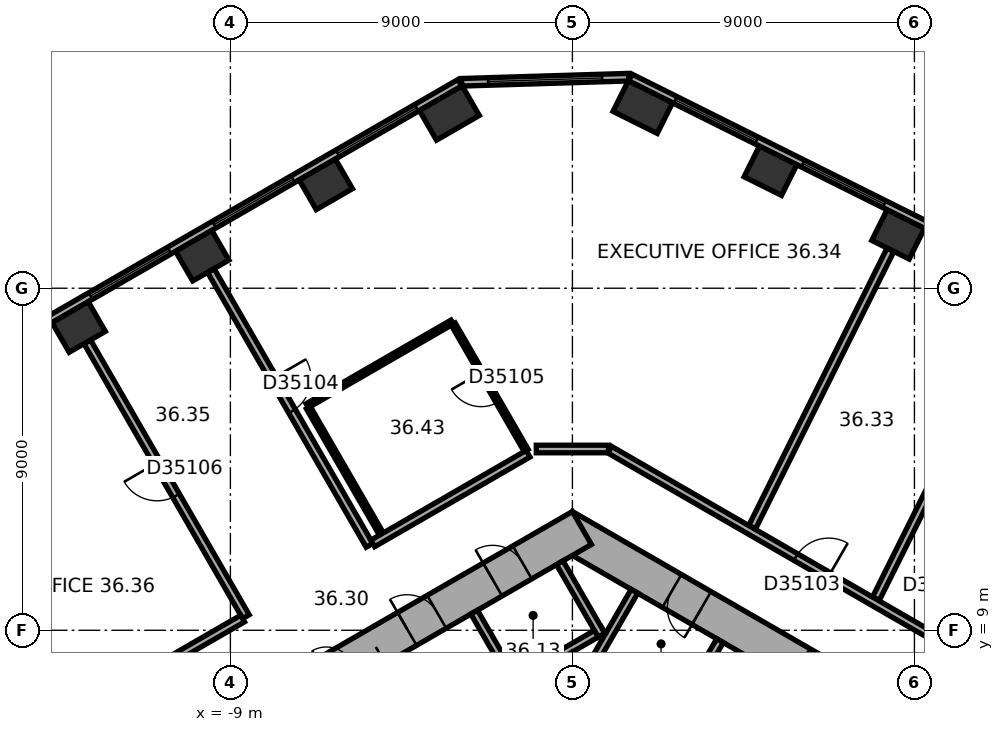
"""IFC4 building model, lengths in metres.
Left out: names, types, materials, properties, quantities, classifications, styles, units other than length and angle.
Written with IfcOpenShell. Run it as: python <this file> out.ifc"""

import sys

from ifc_helpers import new_model, si_unit, direction, frame, frame_2d, origin, origin_2d, place, context, subcontext, project, spatial, rectangle, extrude, element, fill, save


model = new_model("IFC4")
c1 = context("Model", 3, precision=1e-05, world=origin(), true_north=direction((0.0, 1.0)))
c2 = subcontext(c1, "Body", "Model", "MODEL_VIEW")
j1 = project(units=[si_unit("LENGTHUNIT", "METRE"), si_unit("PLANEANGLEUNIT", "RADIAN")], contexts=[c1])
p1 = place(None, origin())
s1 = spatial("IfcSite", under=j1, at=p1, CompositionType="ELEMENT")
p2 = place(p1, origin())
s2 = spatial("IfcBuilding", under=s1, at=p2, CompositionType="ELEMENT")
p3 = place(p2, frame((0.0, 0.0, 150.3)))
s3 = spatial("IfcBuildingStorey", under=s2, at=p3, CompositionType="ELEMENT", Elevation=150.3)
for number, where, z_axis, x_axis in (
    (1, (8.571, 19.416, 0.0), (0.0, 0.0, 1.0), (-0.895, 0.446, 0.0)),
    (2, (5.211, 21.091, 0.0), (0.0, 0.0, 1.0), (-0.895, 0.446, 0.0)),
):
    element("IfcColumn", number, at=place(p3, frame(where, z_axis=z_axis, x_axis=x_axis)), inside=s3, PredefinedType="COLUMN", context=c2, shape_type="SweptSolid", body=[
        extrude(rectangle(XDim=1.1, YDim=0.9, at=origin_2d()), origin(), (0.0, 0.0, 1.0), 3.7),
    ])
for number, where, z_axis, x_axis in (
    (3, (1.852, 22.766, 0.0), (0.0, 0.0, 1.0), (-0.895, 0.446, 0.0)),
    (4, (-3.238, 22.61, 0.0), (0.0, 0.0, 1.0), (-0.866, -0.5, 0.0)),
):
    element("IfcColumn", number, at=place(p3, frame(where, z_axis=z_axis, x_axis=x_axis)), inside=s3, PredefinedType="COLUMN", context=c2, shape_type="SweptSolid", body=[
        extrude(rectangle(XDim=1.3, YDim=0.9, at=origin_2d()), origin(), (0.0, 0.0, 1.0), 3.7),
    ])
for number, where, z_axis, x_axis in (
    (5, (-6.489, 20.733, 0.0), (0.0, 0.0, 1.0), (-0.866, -0.5, 0.0)),
    (6, (-9.74, 18.856, 0.0), (0.0, 0.0, 1.0), (-0.866, -0.5, 0.0)),
    (7, (-12.991, 16.979, 0.0), (0.0, 0.0, 1.0), (-0.866, -0.5, 0.0)),
):
    element("IfcColumn", number, at=place(p3, frame(where, z_axis=z_axis, x_axis=x_axis)), inside=s3, PredefinedType="COLUMN", context=c2, shape_type="SweptSolid", body=[
        extrude(rectangle(XDim=1.1, YDim=0.9, at=origin_2d()), origin(), (0.0, 0.0, 1.0), 3.7),
    ])
p4 = place(p3, frame((10.25, 5.629, 0.0), z_axis=(0.0, 0.0, 1.0), x_axis=(-0.866022616891, 0.50000482701, 0.0)))
e8 = element("IfcWall", 8, at=p4, inside=s3, PredefinedType="SHEAR", context=c2, shape_type="SweptSolid", body=[
    extrude(rectangle(XDim=12.125, YDim=1.0, at=frame_2d((6.062, 0.0))), origin(), (0.0, 0.0, 1.0), 3.7),
])
p5 = place(p4, frame((4.012, 0.0, 0.0)))
e9 = element("IfcOpeningElement", 9, at=p5, cuts=e8, PredefinedType="OPENING", context=c2, shape_type="SweptSolid", body=[
    extrude(rectangle(XDim=0.9, YDim=2.1, at=frame_2d((0.45, 1.05))), frame((0.0, 0.51, 0.0), z_axis=(0.0, -1.0, 0.0), x_axis=(1.0, 0.0, 0.0)), (0.0, 0.0, 1.0), 1.02),
])
p6 = place(p4, frame((7.912, 0.0, 0.0)))
e10 = element("IfcOpeningElement", 10, at=p6, cuts=e8, PredefinedType="OPENING", context=c2, shape_type="SweptSolid", body=[
    extrude(rectangle(XDim=0.9, YDim=2.1, at=frame_2d((0.45, 1.05))), frame((0.0, 0.51, 0.0), z_axis=(0.0, -1.0, 0.0), x_axis=(1.0, 0.0, 0.0)), (0.0, 0.0, 1.0), 1.02),
])
p7 = place(p3, frame((0.25, 11.691, 0.0), z_axis=(0.0, 0.0, 1.0), x_axis=(-0.866022616891, -0.50000482701, 0.0)))
e11 = element("IfcWall", 11, at=p7, inside=s3, PredefinedType="SHEAR", context=c2, shape_type="SweptSolid", body=[
    extrude(rectangle(XDim=12.125, YDim=1.0, at=frame_2d((6.062, 0.0))), origin(), (0.0, 0.0, 1.0), 3.7),
])
p8 = place(p7, frame((6.262, 0.0, 0.0)))
e12 = element("IfcOpeningElement", 12, at=p8, cuts=e11, PredefinedType="OPENING", context=c2, shape_type="SweptSolid", body=[
    extrude(rectangle(XDim=1.5, YDim=2.1, at=frame_2d((0.75, 1.05))), frame((0.0, 0.51, 0.0), z_axis=(0.0, -1.0, 0.0), x_axis=(1.0, 0.0, 0.0)), (0.0, 0.0, 1.0), 1.02),
])
p9 = place(p7, frame((1.812, 0.0, 0.0)))
e13 = element("IfcOpeningElement", 13, at=p9, cuts=e11, PredefinedType="OPENING", context=c2, shape_type="SweptSolid", body=[
    extrude(rectangle(XDim=0.9, YDim=2.1, at=frame_2d((0.45, 1.05))), frame((0.0, 0.51, 0.0), z_axis=(0.0, -1.0, 0.0), x_axis=(1.0, 0.0, 0.0)), (0.0, 0.0, 1.0), 1.02),
])
p10 = place(p7, frame((4.412, 0.0, 0.0)))
e14 = element("IfcOpeningElement", 14, at=p10, cuts=e11, PredefinedType="OPENING", context=c2, shape_type="SweptSolid", body=[
    extrude(rectangle(XDim=0.9, YDim=2.1, at=frame_2d((0.45, 1.05))), frame((0.0, 0.51, 0.0), z_axis=(0.0, -1.0, 0.0), x_axis=(1.0, 0.0, 0.0)), (0.0, 0.0, 1.0), 1.02),
])
p11 = place(p3, frame((19.464, 14.599, 0.0), z_axis=(0.0, 0.0, 1.0), x_axis=(-0.894935755043, 0.446195018289, 0.0)))
e15 = element("IfcWall", 15, at=p11, inside=s3, PredefinedType="STANDARD", context=c2, shape_type="SweptSolid", body=[
    extrude(rectangle(XDim=20.044, YDim=0.2, at=frame_2d((10.022, 0.0))), origin(), (0.0, 0.0, 1.0), 3.7),
])
p12 = place(p11, frame((1.313, 0.0, 0.9)))
e16 = element("IfcOpeningElement", 16, at=p12, cuts=e15, PredefinedType="OPENING", context=c2, shape_type="SweptSolid", body=[
    extrude(rectangle(XDim=2.4, YDim=2.0, at=frame_2d((1.2, 1.0))), frame((0.0, 0.11, 0.0), z_axis=(0.0, -1.0, 0.0), x_axis=(1.0, 0.0, 0.0)), (0.0, 0.0, 1.0), 0.22),
])
p13 = place(p11, frame((5.067, 0.0, 0.9)))
e17 = element("IfcOpeningElement", 17, at=p13, cuts=e15, PredefinedType="OPENING", context=c2, shape_type="SweptSolid", body=[
    extrude(rectangle(XDim=2.4, YDim=2.0, at=frame_2d((1.2, 1.0))), frame((0.0, 0.11, 0.0), z_axis=(0.0, -1.0, 0.0), x_axis=(1.0, 0.0, 0.0)), (0.0, 0.0, 1.0), 0.22),
])
p14 = place(p11, frame((8.821, 0.0, 0.9)))
e18 = element("IfcOpeningElement", 18, at=p14, cuts=e15, PredefinedType="OPENING", context=c2, shape_type="SweptSolid", body=[
    extrude(rectangle(XDim=2.4, YDim=2.0, at=frame_2d((1.2, 1.0))), frame((0.0, 0.11, 0.0), z_axis=(0.0, -1.0, 0.0), x_axis=(1.0, 0.0, 0.0)), (0.0, 0.0, 1.0), 0.22),
])
p15 = place(p11, frame((12.575, 0.0, 0.9)))
e19 = element("IfcOpeningElement", 19, at=p15, cuts=e15, PredefinedType="OPENING", context=c2, shape_type="SweptSolid", body=[
    extrude(rectangle(XDim=2.4, YDim=2.0, at=frame_2d((1.2, 1.0))), frame((0.0, 0.11, 0.0), z_axis=(0.0, -1.0, 0.0), x_axis=(1.0, 0.0, 0.0)), (0.0, 0.0, 1.0), 0.22),
])
p16 = place(p11, frame((16.329, 0.0, 0.9)))
e20 = element("IfcOpeningElement", 20, at=p16, cuts=e15, PredefinedType="OPENING", context=c2, shape_type="SweptSolid", body=[
    extrude(rectangle(XDim=2.4, YDim=2.0, at=frame_2d((1.2, 1.0))), frame((0.0, 0.11, 0.0), z_axis=(0.0, -1.0, 0.0), x_axis=(1.0, 0.0, 0.0)), (0.0, 0.0, 1.0), 0.22),
])
p17 = place(p3, frame((1.479, 23.553, 0.0), z_axis=(0.0, 0.0, 1.0), x_axis=(-0.999534786117, -0.03049936625, 0.0)))
e21 = element("IfcWall", 21, at=p17, inside=s3, PredefinedType="STANDARD", context=c2, shape_type="SweptSolid", body=[
    extrude(rectangle(XDim=4.395, YDim=0.2, at=frame_2d((2.197, 0.0))), origin(), (0.0, 0.0, 1.0), 3.7),
])
p18 = place(p17, frame((0.698, 0.0, 0.9)))
e22 = element("IfcOpeningElement", 22, at=p18, cuts=e21, PredefinedType="OPENING", context=c2, shape_type="SweptSolid", body=[
    extrude(rectangle(XDim=3.0, YDim=2.0, at=frame_2d((1.5, 1.0))), frame((0.0, 0.11, 0.0), z_axis=(0.0, -1.0, 0.0), x_axis=(1.0, 0.0, 0.0)), (0.0, 0.0, 1.0), 0.22),
])
p19 = place(p3, frame((-2.961, 23.405, 0.0), z_axis=(0.0, 0.0, 1.0), x_axis=(-0.866023315909, -0.500003616288, 0.0)))
e23 = element("IfcWall", 23, at=p19, inside=s3, PredefinedType="STANDARD", context=c2, shape_type="SweptSolid", body=[
    extrude(rectangle(XDim=20.044, YDim=0.2, at=frame_2d((10.022, 0.0))), origin(), (0.0, 0.0, 1.0), 3.7),
])
p20 = place(p19, frame((1.314, 0.0, 0.9)))
e24 = element("IfcOpeningElement", 24, at=p20, cuts=e23, PredefinedType="OPENING", context=c2, shape_type="SweptSolid", body=[
    extrude(rectangle(XDim=2.4, YDim=2.0, at=frame_2d((1.2, 1.0))), frame((0.0, 0.11, 0.0), z_axis=(0.0, -1.0, 0.0), x_axis=(1.0, 0.0, 0.0)), (0.0, 0.0, 1.0), 0.22),
])
p21 = place(p19, frame((5.069, 0.0, 0.9)))
e25 = element("IfcOpeningElement", 25, at=p21, cuts=e23, PredefinedType="OPENING", context=c2, shape_type="SweptSolid", body=[
    extrude(rectangle(XDim=2.4, YDim=2.0, at=frame_2d((1.2, 1.0))), frame((0.0, 0.11, 0.0), z_axis=(0.0, -1.0, 0.0), x_axis=(1.0, 0.0, 0.0)), (0.0, 0.0, 1.0), 0.22),
])
p22 = place(p19, frame((8.823, 0.0, 0.9)))
e26 = element("IfcOpeningElement", 26, at=p22, cuts=e23, PredefinedType="OPENING", context=c2, shape_type="SweptSolid", body=[
    extrude(rectangle(XDim=2.4, YDim=2.0, at=frame_2d((1.2, 1.0))), frame((0.0, 0.11, 0.0), z_axis=(0.0, -1.0, 0.0), x_axis=(1.0, 0.0, 0.0)), (0.0, 0.0, 1.0), 0.22),
])
p23 = place(p19, frame((12.577, 0.0, 0.9)))
e27 = element("IfcOpeningElement", 27, at=p23, cuts=e23, PredefinedType="OPENING", context=c2, shape_type="SweptSolid", body=[
    extrude(rectangle(XDim=2.4, YDim=2.0, at=frame_2d((1.2, 1.0))), frame((0.0, 0.11, 0.0), z_axis=(0.0, -1.0, 0.0), x_axis=(1.0, 0.0, 0.0)), (0.0, 0.0, 1.0), 0.22),
])
p24 = place(p19, frame((16.331, 0.0, 0.9)))
e28 = element("IfcOpeningElement", 28, at=p24, cuts=e23, PredefinedType="OPENING", context=c2, shape_type="SweptSolid", body=[
    extrude(rectangle(XDim=2.4, YDim=2.0, at=frame_2d((1.2, 1.0))), frame((0.0, 0.11, 0.0), z_axis=(0.0, -1.0, 0.0), x_axis=(1.0, 0.0, 0.0)), (0.0, 0.0, 1.0), 0.22),
])
for number, where, z_axis, x_axis in (
    (29, (2.784, 6.822, 0.0), (0.0, 0.0, 1.0), (0.5, 0.866, 0.0)),
    (30, (0.532, 8.122, 0.0), (0.0, 0.0, 1.0), (0.5, 0.866, 0.0)),
):
    element("IfcWall", number, at=place(p3, frame(where, z_axis=z_axis, x_axis=x_axis)), inside=s3, PredefinedType="PARTITIONING", context=c2, shape_type="SweptSolid", body=[
        extrude(rectangle(XDim=2.2, YDim=0.2, at=frame_2d((1.1, 0.0))), origin(), (0.0, 0.0, 1.0), 3.42),
    ])
p25 = place(p3, frame((0.803, 9.009, 0.0), z_axis=(0.0, 0.0, 1.0), x_axis=(-0.866028230842, -0.499995103361, 0.0)))
e31 = element("IfcWall", 31, at=p25, inside=s3, PredefinedType="PARTITIONING", context=c2, shape_type="SweptSolid", body=[
    extrude(rectangle(XDim=5.4, YDim=0.2, at=frame_2d((2.7, 0.0))), origin(), (0.0, 0.0, 1.0), 3.42),
])
p26 = place(p3, frame((0.767, 8.872, 0.0), z_axis=(0.0, 0.0, 1.0), x_axis=(-0.499994660107, 0.866028486751, 0.0)))
e32 = element("IfcWall", 32, at=p26, inside=s3, PredefinedType="PARTITIONING", context=c2, shape_type="SweptSolid", body=[
    extrude(rectangle(XDim=2.2, YDim=0.2, at=frame_2d((1.1, 0.0))), origin(), (0.0, 0.0, 1.0), 3.42),
])
p27 = place(p3, frame((-1.485, 7.572, 0.0), z_axis=(0.0, 0.0, 1.0), x_axis=(-0.50002983664, 0.866008176907, 0.0)))
e33 = element("IfcWall", 33, at=p27, inside=s3, PredefinedType="PARTITIONING", context=c2, shape_type="SweptSolid", body=[
    extrude(rectangle(XDim=2.2, YDim=0.2, at=frame_2d((1.1, 0.0))), origin(), (0.0, 0.0, 1.0), 3.42),
])
p28 = place(p3, frame((-2.216, 4.282, 0.0), z_axis=(0.0, 0.0, 1.0), x_axis=(0.499977259774, 0.866038532462, 0.0)))
e34 = element("IfcWall", 34, at=p28, inside=s3, PredefinedType="SHEAR", context=c2, shape_type="SweptSolid", body=[
    extrude(rectangle(XDim=4.7, YDim=0.3, at=frame_2d((2.35, 0.0))), origin(), (0.0, 0.0, 1.0), 3.42),
])
p29 = place(p3, frame((-12.766, 16.589, 0.0), z_axis=(0.0, 0.0, 1.0), x_axis=(0.500010139422, -0.866019549707, 0.0)))
e35 = element("IfcWall", 35, at=p29, inside=s3, PredefinedType="PARTITIONING", context=c2, shape_type="SweptSolid", body=[
    extrude(rectangle(XDim=8.35, YDim=0.2, at=frame_2d((4.175, 0.0))), origin(), (0.0, 0.0, 1.0), 3.42),
])
p30 = place(p29, frame((3.675, 0.0, 0.0)))
e36 = element("IfcOpeningElement", 36, at=p30, cuts=e35, PredefinedType="OPENING", context=c2, shape_type="SweptSolid", body=[
    extrude(rectangle(XDim=1.0, YDim=2.1, at=frame_2d((0.5, 1.05))), frame((0.0, 0.11, 0.0), z_axis=(0.0, -1.0, 0.0), x_axis=(1.0, 0.0, 0.0)), (0.0, 0.0, 1.0), 0.22),
])
p31 = place(p3, frame((-9.515, 18.466, 0.0), z_axis=(0.0, 0.0, 1.0), x_axis=(0.500010139422, -0.866019549707, 0.0)))
e37 = element("IfcWall", 37, at=p31, inside=s3, PredefinedType="PARTITIONING", context=c2, shape_type="SweptSolid", body=[
    extrude(rectangle(XDim=8.35, YDim=0.2, at=frame_2d((4.175, 0.0))), origin(), (0.0, 0.0, 1.0), 2.87),
])
p32 = place(p31, frame((3.275, 0.0, 0.0)))
e38 = element("IfcOpeningElement", 38, at=p32, cuts=e37, PredefinedType="OPENING", context=c2, shape_type="SweptSolid", body=[
    extrude(rectangle(XDim=1.0, YDim=2.1, at=frame_2d((0.5, 1.05))), frame((0.0, 0.11, 0.0), z_axis=(0.0, -1.0, 0.0), x_axis=(1.0, 0.0, 0.0)), (0.0, 0.0, 1.0), 0.22),
])
p33 = place(p3, frame((-8.678, 9.308, 0.0), z_axis=(0.0, 0.0, 1.0), x_axis=(-0.866000359435, -0.500043375578, 0.0)))
e39 = element("IfcWall", 39, at=p33, inside=s3, PredefinedType="PARTITIONING", context=c2, shape_type="SweptSolid", body=[
    extrude(rectangle(XDim=3.161, YDim=0.2, at=frame_2d((1.581, 0.0))), origin(), (0.0, 0.0, 1.0), 3.42),
])
p34 = place(p3, frame((-6.977, 14.909, 0.0), z_axis=(0.0, 0.0, 1.0), x_axis=(0.866032203192, 0.499988222896, 0.0)))
e40 = element("IfcWall", 40, at=p34, inside=s3, PredefinedType="PARTITIONING", context=c2, shape_type="SweptSolid", body=[
    extrude(rectangle(XDim=4.4, YDim=0.12, at=frame_2d((2.2, 0.0))), origin(), (0.0, 0.0, 1.0), 3.42),
])
p35 = place(p3, frame((-5.027, 11.531, 0.0), z_axis=(0.0, 0.0, 1.0), x_axis=(-0.499995802899, 0.866027826969, 0.0)))
e41 = element("IfcWall", 41, at=p35, inside=s3, PredefinedType="PARTITIONING", context=c2, shape_type="SweptSolid", body=[
    extrude(rectangle(XDim=3.84, YDim=0.12, at=frame_2d((1.92, 0.0))), origin(), (0.0, 0.0, 1.0), 3.42),
])
p36 = place(p3, frame((-3.136, 17.057, 0.0), z_axis=(0.0, 0.0, 1.0), x_axis=(0.499995802899, -0.866027826969, 0.0)))
e42 = element("IfcWall", 42, at=p36, inside=s3, PredefinedType="PARTITIONING", context=c2, shape_type="SweptSolid", body=[
    extrude(rectangle(XDim=3.84, YDim=0.12, at=frame_2d((1.92, 0.0))), origin(), (0.0, 0.0, 1.0), 3.42),
])
p37 = place(p36, frame((1.47, 0.0, 0.0)))
e43 = element("IfcOpeningElement", 43, at=p37, cuts=e42, PredefinedType="OPENING", context=c2, shape_type="SweptSolid", body=[
    extrude(rectangle(XDim=0.9, YDim=2.1, at=frame_2d((0.45, 1.05))), frame((0.0, 0.07, 0.0), z_axis=(0.0, -1.0, 0.0), x_axis=(1.0, 0.0, 0.0)), (0.0, 0.0, 1.0), 0.14),
])
p38 = place(p3, frame((-1.167, 13.645, 0.0), z_axis=(0.0, 0.0, 1.0), x_axis=(-0.866034830959, -0.499983671299, 0.0)))
e44 = element("IfcWall", 44, at=p38, inside=s3, PredefinedType="PARTITIONING", context=c2, shape_type="SweptSolid", body=[
    extrude(rectangle(XDim=4.719, YDim=0.2, at=frame_2d((2.36, 0.0))), origin(), (0.0, 0.0, 1.0), 3.42),
])
p39 = place(p3, frame((0.95, 13.77, 0.0), z_axis=(0.0, 0.0, 1.0), x_axis=(-1.0, 0.0, 0.0)))
e45 = element("IfcWall", 45, at=p39, inside=s3, PredefinedType="PARTITIONING", context=c2, shape_type="SweptSolid", body=[
    extrude(rectangle(XDim=1.9, YDim=0.2, at=frame_2d((0.95, 0.0))), origin(), (0.0, 0.0, 1.0), 3.42),
])
p40 = place(p3, frame((8.37, 19.013, 0.0), z_axis=(0.0, 0.0, 1.0), x_axis=(-0.446183598632, -0.894941448538, 0.0)))
e46 = element("IfcWall", 46, at=p40, inside=s3, PredefinedType="PARTITIONING", context=c2, shape_type="SweptSolid", body=[
    extrude(rectangle(XDim=8.156, YDim=0.2, at=frame_2d((4.078, 0.0))), origin(), (0.0, 0.0, 1.0), 3.42),
])
p41 = place(p3, frame((11.233, 7.833, 0.0), z_axis=(0.0, 0.0, 1.0), x_axis=(-0.866021713988, 0.50000639086, 0.0)))
e47 = element("IfcWall", 47, at=p41, inside=s3, PredefinedType="PARTITIONING", context=c2, shape_type="SweptSolid", body=[
    extrude(rectangle(XDim=11.834, YDim=0.2, at=frame_2d((5.917, 0.0))), origin(), (0.0, 0.0, 1.0), 3.42),
])
p42 = place(p41, frame((5.185, 0.0, 0.0)))
e48 = element("IfcOpeningElement", 48, at=p42, cuts=e47, PredefinedType="OPENING", context=c2, shape_type="SweptSolid", body=[
    extrude(rectangle(XDim=1.0, YDim=2.1, at=frame_2d((0.5, 1.05))), frame((0.0, 0.11, 0.0), z_axis=(0.0, -1.0, 0.0), x_axis=(1.0, 0.0, 0.0)), (0.0, 0.0, 1.0), 0.22),
])
p43 = place(p3, frame((11.73, 17.338, 0.0), z_axis=(0.0, 0.0, 1.0), x_axis=(-0.446165200553, -0.894950620881, 0.0)))
e49 = element("IfcWall", 49, at=p43, inside=s3, PredefinedType="PARTITIONING", context=c2, shape_type="SweptSolid", body=[
    extrude(rectangle(XDim=8.386, YDim=0.2, at=frame_2d((4.193, 0.0))), origin(), (0.0, 0.0, 1.0), 2.87),
])
p44 = place(p15, origin())
e50 = element("IfcWindow", 50, at=p44, inside=s3, PartitioningType="SINGLE_PANEL", PredefinedType="WINDOW", context=c2, shape_type="SweptSolid", body=[
    extrude(rectangle(XDim=2.4, YDim=2.0, at=frame_2d((1.2, 1.0))), frame((0.0, 0.03, 0.0), z_axis=(0.0, -1.0, 0.0), x_axis=(1.0, 0.0, 0.0)), (0.0, 0.0, 1.0), 0.06),
])
fill(e19, e50)
p45 = place(p16, origin())
e51 = element("IfcWindow", 51, at=p45, inside=s3, PartitioningType="SINGLE_PANEL", PredefinedType="WINDOW", context=c2, shape_type="SweptSolid", body=[
    extrude(rectangle(XDim=2.4, YDim=2.0, at=frame_2d((1.2, 1.0))), frame((0.0, 0.03, 0.0), z_axis=(0.0, -1.0, 0.0), x_axis=(1.0, 0.0, 0.0)), (0.0, 0.0, 1.0), 0.06),
])
fill(e20, e51)
p46 = place(p18, origin())
e52 = element("IfcWindow", 52, at=p46, inside=s3, PartitioningType="SINGLE_PANEL", PredefinedType="WINDOW", context=c2, shape_type="SweptSolid", body=[
    extrude(rectangle(XDim=3.0, YDim=2.0, at=frame_2d((1.5, 1.0))), frame((0.0, 0.03, 0.0), z_axis=(0.0, -1.0, 0.0), x_axis=(1.0, 0.0, 0.0)), (0.0, 0.0, 1.0), 0.06),
])
fill(e22, e52)
p47 = place(p20, origin())
e53 = element("IfcWindow", 53, at=p47, inside=s3, PartitioningType="SINGLE_PANEL", PredefinedType="WINDOW", context=c2, shape_type="SweptSolid", body=[
    extrude(rectangle(XDim=2.4, YDim=2.0, at=frame_2d((1.2, 1.0))), frame((0.0, 0.03, 0.0), z_axis=(0.0, -1.0, 0.0), x_axis=(1.0, 0.0, 0.0)), (0.0, 0.0, 1.0), 0.06),
])
fill(e24, e53)
p48 = place(p21, origin())
e54 = element("IfcWindow", 54, at=p48, inside=s3, PartitioningType="SINGLE_PANEL", PredefinedType="WINDOW", context=c2, shape_type="SweptSolid", body=[
    extrude(rectangle(XDim=2.4, YDim=2.0, at=frame_2d((1.2, 1.0))), frame((0.0, 0.03, 0.0), z_axis=(0.0, -1.0, 0.0), x_axis=(1.0, 0.0, 0.0)), (0.0, 0.0, 1.0), 0.06),
])
fill(e25, e54)
p49 = place(p22, origin())
e55 = element("IfcWindow", 55, at=p49, inside=s3, PartitioningType="SINGLE_PANEL", PredefinedType="WINDOW", context=c2, shape_type="SweptSolid", body=[
    extrude(rectangle(XDim=2.4, YDim=2.0, at=frame_2d((1.2, 1.0))), frame((0.0, 0.03, 0.0), z_axis=(0.0, -1.0, 0.0), x_axis=(1.0, 0.0, 0.0)), (0.0, 0.0, 1.0), 0.06),
])
fill(e26, e55)
p50 = place(p8, origin())
e56 = element("IfcDoor", 56, at=p50, inside=s3, OperationType="DOUBLE_DOOR_SINGLE_SWING", PredefinedType="DOOR", context=c2, shape_type="SweptSolid", body=[
    extrude(rectangle(XDim=1.5, YDim=2.1, at=frame_2d((0.75, 1.05))), frame((0.0, 0.025, 0.0), z_axis=(0.0, -1.0, 0.0), x_axis=(1.0, 0.0, 0.0)), (0.0, 0.0, 1.0), 0.05),
])
fill(e12, e56)
p51 = place(p6, origin())
e57 = element("IfcDoor", 57, at=p51, inside=s3, OperationType="SINGLE_SWING_LEFT", PredefinedType="DOOR", context=c2, shape_type="SweptSolid", body=[
    extrude(rectangle(XDim=0.9, YDim=2.1, at=frame_2d((0.45, 1.05))), frame((0.0, 0.025, 0.0), z_axis=(0.0, -1.0, 0.0), x_axis=(1.0, 0.0, 0.0)), (0.0, 0.0, 1.0), 0.05),
])
fill(e10, e57)
p52 = place(p9, origin())
e58 = element("IfcDoor", 58, at=p52, inside=s3, OperationType="SINGLE_SWING_LEFT", PredefinedType="DOOR", context=c2, shape_type="SweptSolid", body=[
    extrude(rectangle(XDim=0.9, YDim=2.1, at=frame_2d((0.45, 1.05))), frame((0.0, 0.025, 0.0), z_axis=(0.0, -1.0, 0.0), x_axis=(1.0, 0.0, 0.0)), (0.0, 0.0, 1.0), 0.05),
])
fill(e13, e58)
p53 = place(p10, origin())
e59 = element("IfcDoor", 59, at=p53, inside=s3, OperationType="SINGLE_SWING_LEFT", PredefinedType="DOOR", context=c2, shape_type="SweptSolid", body=[
    extrude(rectangle(XDim=0.9, YDim=2.1, at=frame_2d((0.45, 1.05))), frame((0.0, 0.025, 0.0), z_axis=(0.0, -1.0, 0.0), x_axis=(1.0, 0.0, 0.0)), (0.0, 0.0, 1.0), 0.05),
])
fill(e14, e59)
p54 = place(p42, origin())
e60 = element("IfcDoor", 60, at=p54, inside=s3, OperationType="SINGLE_SWING_LEFT", PredefinedType="DOOR", context=c2, shape_type="SweptSolid", body=[
    extrude(rectangle(XDim=1.0, YDim=2.1, at=frame_2d((0.5, 1.05))), frame((0.0, 0.025, 0.0), z_axis=(0.0, -1.0, 0.0), x_axis=(1.0, 0.0, 0.0)), (0.0, 0.0, 1.0), 0.05),
])
fill(e48, e60)
p55 = place(p32, origin())
e61 = element("IfcDoor", 61, at=p55, inside=s3, OperationType="SINGLE_SWING_LEFT", PredefinedType="DOOR", context=c2, shape_type="SweptSolid", body=[
    extrude(rectangle(XDim=1.0, YDim=2.1, at=frame_2d((0.5, 1.05))), frame((0.0, 0.025, 0.0), z_axis=(0.0, -1.0, 0.0), x_axis=(1.0, 0.0, 0.0)), (0.0, 0.0, 1.0), 0.05),
])
fill(e38, e61)
p56 = place(p37, origin())
e62 = element("IfcDoor", 62, at=p56, inside=s3, OperationType="SINGLE_SWING_LEFT", PredefinedType="DOOR", context=c2, shape_type="SweptSolid", body=[
    extrude(rectangle(XDim=0.9, YDim=2.1, at=frame_2d((0.45, 1.05))), frame((0.0, 0.025, 0.0), z_axis=(0.0, -1.0, 0.0), x_axis=(1.0, 0.0, 0.0)), (0.0, 0.0, 1.0), 0.05),
])
fill(e43, e62)
p57 = place(p30, origin())
e63 = element("IfcDoor", 63, at=p57, inside=s3, OperationType="SINGLE_SWING_LEFT", PredefinedType="DOOR", context=c2, shape_type="SweptSolid", body=[
    extrude(rectangle(XDim=1.0, YDim=2.1, at=frame_2d((0.5, 1.05))), frame((0.0, 0.025, 0.0), z_axis=(0.0, -1.0, 0.0), x_axis=(1.0, 0.0, 0.0)), (0.0, 0.0, 1.0), 0.05),
])
fill(e36, e63)
save(model, sys.argv[1])
